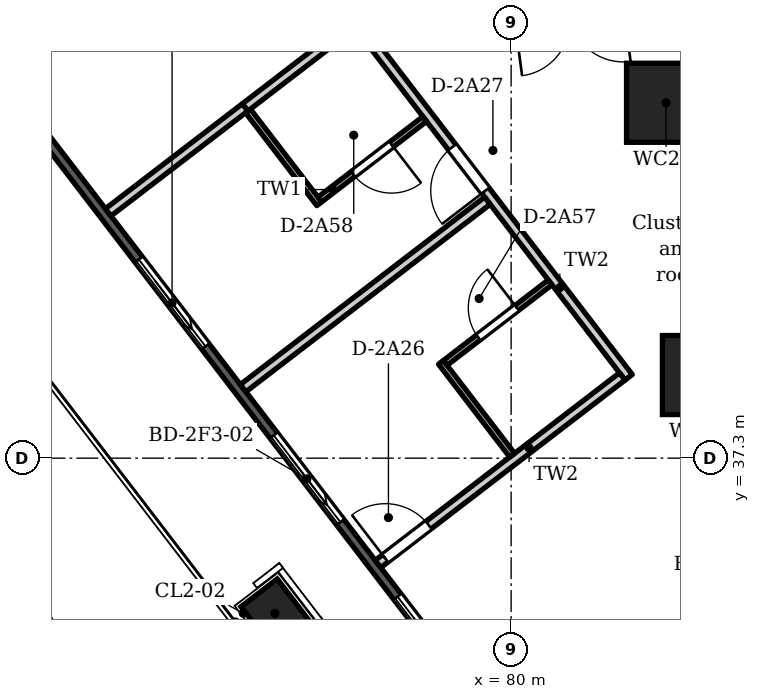
"""IFC4 building model, lengths in metres.
Left out: names, types, materials, properties, quantities, classifications, styles, units other than length and angle.
Written with IfcOpenShell. Run it as: python <this file> out.ifc"""

import sys

from ifc_helpers import new_model, si_unit, direction, frame, frame_2d, origin, origin_2d, place, context, subcontext, project, spatial, polyline, rectangle, circle, outline, extrude, element, fill, save


model = new_model("IFC4")
c1 = context("Model", 3, precision=1e-05, world=origin(), true_north=direction((0.0, 1.0)))
c2 = subcontext(c1, "Body", "Model", "MODEL_VIEW")
j1 = project(units=[si_unit("LENGTHUNIT", "METRE"), si_unit("PLANEANGLEUNIT", "RADIAN")], contexts=[c1])
p1 = place(None, origin())
s1 = spatial("IfcSite", under=j1, at=p1, CompositionType="ELEMENT")
p2 = place(p1, origin())
s2 = spatial("IfcBuilding", under=s1, at=p2, CompositionType="ELEMENT")
p3 = place(p2, frame((0.0, 0.0, 50.4)))
s3 = spatial("IfcBuildingStorey", under=s2, at=p3, CompositionType="ELEMENT", Elevation=50.4)
p4 = place(p3, frame((76.114, 34.749, -0.35), z_axis=(0.0, 0.0, 1.0), x_axis=(-0.608761429009, 0.793353340291, 0.0)))
e1 = element("IfcColumn", 1, at=p4, inside=s3, PredefinedType="COLUMN", context=c2, shape_type="SweptSolid", body=[
    extrude(rectangle(XDim=0.85, YDim=0.75, at=origin_2d()), origin(), (0.0, 0.0, 1.0), 3.95),
])
for number, where, z_axis, x_axis in (
    (2, (82.548, 43.145, -0.35), (0.0, 0.0, 1.0), (1.0, 0.0, 0.0)),
    (3, (83.138, 38.667, -0.35), (0.0, 0.0, 1.0), (1.0, 0.0, 0.0)),
):
    element("IfcColumn", number, at=place(p3, frame(where, z_axis=z_axis, x_axis=x_axis)), inside=s3, PredefinedType="COLUMN", context=c2, shape_type="SweptSolid", body=[
        extrude(circle(Radius=0.65, at=origin_2d()), origin(), (0.0, 0.0, 1.0), 3.95),
    ])
p5 = place(p3, frame((84.684, 34.584, 0.0), z_axis=(0.0, 0.0, 1.0), x_axis=(-0.991449308994, -0.130492404742, 0.0)))
e4 = element("IfcWall", 4, at=p5, inside=s3, PredefinedType="SOLIDWALL", context=c2, shape_type="SweptSolid", body=[
    extrude(outline(polyline([(0.0, -0.075), (2.0, -0.075), (2.0, 0.075), (0.0, 0.075), (0.0, -0.075)])), origin(), (0.0, 0.0, 1.0), 3.3),
])
p6 = place(p3, frame((79.969, 32.624, 0.0), z_axis=(0.0, 0.0, 1.0), x_axis=(-0.608761526367, 0.793353265585, 0.0)))
e5 = element("IfcWall", 5, at=p6, inside=s3, PredefinedType="SOLIDWALL", context=c2, shape_type="SweptSolid", body=[
    extrude(outline(polyline([(0.149, 0.075), (0.149, -0.075), (47.217, -0.075), (47.217, 0.075), (0.149, 0.075)])), origin(), (0.0, 0.0, 1.0), 3.3),
])
p7 = place(p6, frame((1.222, 0.0, 0.0)))
e6 = element("IfcOpeningElement", 6, at=p7, cuts=e5, PredefinedType="OPENING", context=c2, shape_type="SweptSolid", body=[
    extrude(rectangle(XDim=1.8, YDim=2.6, at=frame_2d((0.9, 1.3))), frame((0.0, 0.085, 0.0), z_axis=(0.0, -1.0, 0.0), x_axis=(1.0, 0.0, 0.0)), (0.0, 0.0, 1.0), 0.17),
])
p8 = place(p6, frame((4.565, 0.0, 0.0)))
e7 = element("IfcOpeningElement", 7, at=p8, cuts=e5, PredefinedType="OPENING", context=c2, shape_type="SweptSolid", body=[
    extrude(rectangle(XDim=1.8, YDim=2.6, at=frame_2d((0.9, 1.3))), frame((0.0, 0.085, 0.0), z_axis=(0.0, -1.0, 0.0), x_axis=(1.0, 0.0, 0.0)), (0.0, 0.0, 1.0), 0.17),
])
p9 = place(p6, frame((8.209, 0.0, 0.0)))
e8 = element("IfcOpeningElement", 8, at=p9, cuts=e5, PredefinedType="OPENING", context=c2, shape_type="SweptSolid", body=[
    extrude(rectangle(XDim=1.8, YDim=2.6, at=frame_2d((0.9, 1.3))), frame((0.0, 0.085, 0.0), z_axis=(0.0, -1.0, 0.0), x_axis=(1.0, 0.0, 0.0)), (0.0, 0.0, 1.0), 0.17),
])
p10 = place(p6, frame((12.453, 0.0, 0.0)))
e9 = element("IfcOpeningElement", 9, at=p10, cuts=e5, PredefinedType="OPENING", context=c2, shape_type="SweptSolid", body=[
    extrude(rectangle(XDim=1.8, YDim=2.6, at=frame_2d((0.9, 1.3))), frame((0.0, 0.085, 0.0), z_axis=(0.0, -1.0, 0.0), x_axis=(1.0, 0.0, 0.0)), (0.0, 0.0, 1.0), 0.17),
])
p11 = place(p6, frame((15.496, 0.0, 0.0)))
e10 = element("IfcOpeningElement", 10, at=p11, cuts=e5, PredefinedType="OPENING", context=c2, shape_type="SweptSolid", body=[
    extrude(rectangle(XDim=1.8, YDim=2.6, at=frame_2d((0.9, 1.3))), frame((0.0, 0.085, 0.0), z_axis=(0.0, -1.0, 0.0), x_axis=(1.0, 0.0, 0.0)), (0.0, 0.0, 1.0), 0.17),
])
p12 = place(p6, frame((18.84, 0.0, 0.15)))
e11 = element("IfcOpeningElement", 11, at=p12, cuts=e5, PredefinedType="OPENING", context=c2, shape_type="SweptSolid", body=[
    extrude(rectangle(XDim=2.4, YDim=2.45, at=frame_2d((1.2, 1.225))), frame((0.0, 0.085, 0.0), z_axis=(0.0, -1.0, 0.0), x_axis=(1.0, 0.0, 0.0)), (0.0, 0.0, 1.0), 0.17),
])
p13 = place(p6, frame((22.783, 0.0, 0.0)))
e12 = element("IfcOpeningElement", 12, at=p13, cuts=e5, PredefinedType="OPENING", context=c2, shape_type="SweptSolid", body=[
    extrude(rectangle(XDim=1.8, YDim=2.6, at=frame_2d((0.9, 1.3))), frame((0.0, 0.085, 0.0), z_axis=(0.0, -1.0, 0.0), x_axis=(1.0, 0.0, 0.0)), (0.0, 0.0, 1.0), 0.17),
])
p14 = place(p6, frame((26.127, 0.0, 0.15)))
e13 = element("IfcOpeningElement", 13, at=p14, cuts=e5, PredefinedType="OPENING", context=c2, shape_type="SweptSolid", body=[
    extrude(rectangle(XDim=2.4, YDim=2.45, at=frame_2d((1.2, 1.225))), frame((0.0, 0.085, 0.0), z_axis=(0.0, -1.0, 0.0), x_axis=(1.0, 0.0, 0.0)), (0.0, 0.0, 1.0), 0.17),
])
p15 = place(p6, frame((30.071, 0.0, 0.0)))
e14 = element("IfcOpeningElement", 14, at=p15, cuts=e5, PredefinedType="OPENING", context=c2, shape_type="SweptSolid", body=[
    extrude(rectangle(XDim=1.8, YDim=2.6, at=frame_2d((0.9, 1.3))), frame((0.0, 0.085, 0.0), z_axis=(0.0, -1.0, 0.0), x_axis=(1.0, 0.0, 0.0)), (0.0, 0.0, 1.0), 0.17),
])
p16 = place(p6, frame((33.114, 0.0, 0.0)))
e15 = element("IfcOpeningElement", 15, at=p16, cuts=e5, PredefinedType="OPENING", context=c2, shape_type="SweptSolid", body=[
    extrude(rectangle(XDim=1.8, YDim=2.6, at=frame_2d((0.9, 1.3))), frame((0.0, 0.085, 0.0), z_axis=(0.0, -1.0, 0.0), x_axis=(1.0, 0.0, 0.0)), (0.0, 0.0, 1.0), 0.17),
])
p17 = place(p6, frame((37.358, 0.0, 0.0)))
e16 = element("IfcOpeningElement", 16, at=p17, cuts=e5, PredefinedType="OPENING", context=c2, shape_type="SweptSolid", body=[
    extrude(rectangle(XDim=1.8, YDim=2.6, at=frame_2d((0.9, 1.3))), frame((0.0, 0.085, 0.0), z_axis=(0.0, -1.0, 0.0), x_axis=(1.0, 0.0, 0.0)), (0.0, 0.0, 1.0), 0.17),
])
p18 = place(p6, frame((41.001, 0.0, 0.0)))
e17 = element("IfcOpeningElement", 17, at=p18, cuts=e5, PredefinedType="OPENING", context=c2, shape_type="SweptSolid", body=[
    extrude(rectangle(XDim=1.8, YDim=2.6, at=frame_2d((0.9, 1.3))), frame((0.0, 0.085, 0.0), z_axis=(0.0, -1.0, 0.0), x_axis=(1.0, 0.0, 0.0)), (0.0, 0.0, 1.0), 0.17),
])
p19 = place(p6, frame((44.345, 0.0, 0.0)))
e18 = element("IfcOpeningElement", 18, at=p19, cuts=e5, PredefinedType="OPENING", context=c2, shape_type="SweptSolid", body=[
    extrude(rectangle(XDim=1.8, YDim=2.6, at=frame_2d((0.9, 1.3))), frame((0.0, 0.085, 0.0), z_axis=(0.0, -1.0, 0.0), x_axis=(1.0, 0.0, 0.0)), (0.0, 0.0, 1.0), 0.17),
])
p20 = place(p3, origin())
e19 = element("IfcWall", 19, at=p20, inside=s3, PredefinedType="PARAPET", context=c2, shape_type="SweptSolid", body=[
    extrude(outline(polyline([(61.885, 52.307), (76.536, 26.931), (76.709, 27.231), (63.284, 50.483), (61.885, 52.307)])), origin(), (0.0, 0.0, 1.0), 1.1),
])
p21 = place(p3, frame((71.088, 52.766, 0.0), z_axis=(0.0, 0.0, 1.0), x_axis=(0.608663951432, -0.793428127953, 0.0)))
e20 = element("IfcWall", 20, at=p21, inside=s3, PredefinedType="PARTITIONING", context=c2, shape_type="SweptSolid", body=[
    extrude(rectangle(XDim=17.817, YDim=0.15, at=frame_2d((8.909, 0.0))), origin(), (0.0, 0.0, 1.0), 3.3),
])
p22 = place(p21, frame((13.048, 0.0, 0.0)))
e21 = element("IfcOpeningElement", 21, at=p22, cuts=e20, PredefinedType="OPENING", context=c2, shape_type="SweptSolid", body=[
    extrude(rectangle(XDim=0.9, YDim=2.1, at=frame_2d((0.45, 1.05))), frame((0.0, 0.085, 0.0), z_axis=(0.0, -1.0, 0.0), x_axis=(1.0, 0.0, 0.0)), (0.0, 0.0, 1.0), 0.17),
])
p23 = place(p21, frame((8.133, 0.0, 0.0)))
e22 = element("IfcOpeningElement", 22, at=p23, cuts=e20, PredefinedType="OPENING", context=c2, shape_type="SweptSolid", body=[
    extrude(rectangle(XDim=1.0, YDim=2.1, at=frame_2d((0.5, 1.05))), frame((0.0, 0.085, 0.0), z_axis=(0.0, -1.0, 0.0), x_axis=(1.0, 0.0, 0.0)), (0.0, 0.0, 1.0), 0.17),
])
p24 = place(p21, frame((3.318, 0.0, 0.0)))
e23 = element("IfcOpeningElement", 23, at=p24, cuts=e20, PredefinedType="OPENING", context=c2, shape_type="SweptSolid", body=[
    extrude(rectangle(XDim=0.9, YDim=2.1, at=frame_2d((0.45, 1.05))), frame((0.0, 0.085, 0.0), z_axis=(0.0, -1.0, 0.0), x_axis=(1.0, 0.0, 0.0)), (0.0, 0.0, 1.0), 0.17),
])
p25 = place(p21, frame((2.118, 0.0, 0.0)))
e24 = element("IfcOpeningElement", 24, at=p25, cuts=e20, PredefinedType="OPENING", context=c2, shape_type="SweptSolid", body=[
    extrude(rectangle(XDim=0.9, YDim=2.1, at=frame_2d((0.45, 1.05))), frame((0.0, 0.085, 0.0), z_axis=(0.0, -1.0, 0.0), x_axis=(1.0, 0.0, 0.0)), (0.0, 0.0, 1.0), 0.17),
])
p26 = place(p3, frame((73.374, 41.342, 0.0), z_axis=(0.0, 0.0, 1.0), x_axis=(0.793546848587, 0.608509161063, 0.0)))
e25 = element("IfcWall", 25, at=p26, inside=s3, PredefinedType="PARTITIONING", context=c2, shape_type="SweptSolid", body=[
    extrude(rectangle(XDim=2.839, YDim=0.15, at=frame_2d((1.42, 0.0))), origin(), (0.0, 0.0, 1.0), 3.3),
])
p27 = place(p3, frame((75.593, 38.451, 0.0), z_axis=(0.0, 0.0, 1.0), x_axis=(0.793302827183, 0.608827253318, 0.0)))
e26 = element("IfcWall", 26, at=p27, inside=s3, PredefinedType="PARTITIONING", context=c2, shape_type="SweptSolid", body=[
    extrude(rectangle(XDim=5.063, YDim=0.15, at=frame_2d((2.532, 0.0))), origin(), (0.0, 0.0, 1.0), 3.3),
])
p28 = place(p3, frame((75.673, 43.01, 0.0), z_axis=(0.0, 0.0, 1.0), x_axis=(0.608790940556, -0.793330694412, 0.0)))
e27 = element("IfcWall", 27, at=p28, inside=s3, PredefinedType="PARTITIONING", context=c2, shape_type="SweptSolid", body=[
    extrude(rectangle(XDim=1.925, YDim=0.1, at=frame_2d((0.962, 0.0))), origin(), (0.0, 0.0, 1.0), 3.3),
])
p29 = place(p3, frame((75.627, 43.07, 0.0), z_axis=(0.0, 0.0, 1.0), x_axis=(0.793313024441, 0.608813966045, 0.0)))
e28 = element("IfcWall", 28, at=p29, inside=s3, PredefinedType="PARTITIONING", context=c2, shape_type="SweptSolid", body=[
    extrude(rectangle(XDim=2.224, YDim=0.15, at=frame_2d((1.112, 0.0))), origin(), (0.0, 0.0, 1.0), 3.3),
])
p30 = place(p3, frame((76.854, 41.553, 0.0), z_axis=(0.0, 0.0, 1.0), x_axis=(0.793308064866, 0.608820428549, 0.0)))
e29 = element("IfcWall", 29, at=p30, inside=s3, PredefinedType="PARTITIONING", context=c2, shape_type="SweptSolid", body=[
    extrude(rectangle(XDim=2.174, YDim=0.1, at=frame_2d((1.087, 0.0))), origin(), (0.0, 0.0, 1.0), 3.3),
])
p31 = place(p30, frame((0.687, 0.0, 0.0)))
e30 = element("IfcOpeningElement", 30, at=p31, cuts=e29, PredefinedType="OPENING", context=c2, shape_type="SweptSolid", body=[
    extrude(rectangle(XDim=0.8, YDim=2.1, at=frame_2d((0.4, 1.05))), frame((0.0, 0.06, 0.0), z_axis=(0.0, -1.0, 0.0), x_axis=(1.0, 0.0, 0.0)), (0.0, 0.0, 1.0), 0.12),
])
p32 = place(p3, frame((77.811, 35.56, 0.0), z_axis=(0.0, 0.0, 1.0), x_axis=(0.793261664916, 0.60888088406, 0.0)))
e31 = element("IfcWall", 31, at=p32, inside=s3, PredefinedType="PARTITIONING", context=c2, shape_type="SweptSolid", body=[
    extrude(rectangle(XDim=5.063, YDim=0.15, at=frame_2d((2.532, 0.0))), origin(), (0.0, 0.0, 1.0), 3.3),
])
p33 = place(p32, frame((0.15, 0.0, 0.0)))
e32 = element("IfcOpeningElement", 32, at=p33, cuts=e31, PredefinedType="OPENING", context=c2, shape_type="SweptSolid", body=[
    extrude(rectangle(XDim=0.9, YDim=2.1, at=frame_2d((0.45, 1.05))), frame((0.0, 0.085, 0.0), z_axis=(0.0, -1.0, 0.0), x_axis=(1.0, 0.0, 0.0)), (0.0, 0.0, 1.0), 0.17),
])
p34 = place(p3, frame((78.846, 38.876, 0.0), z_axis=(0.0, 0.0, 1.0), x_axis=(0.608649853766, -0.793438942522, 0.0)))
e33 = element("IfcWall", 33, at=p34, inside=s3, PredefinedType="PARTITIONING", context=c2, shape_type="SweptSolid", body=[
    extrude(rectangle(XDim=1.925, YDim=0.1, at=frame_2d((0.962, 0.0))), origin(), (0.0, 0.0, 1.0), 3.3),
])
p35 = place(p3, frame((78.916, 38.866, 0.0), z_axis=(0.0, 0.0, 1.0), x_axis=(0.793266438723, 0.608874664603, 0.0)))
e34 = element("IfcWall", 34, at=p35, inside=s3, PredefinedType="PARTITIONING", context=c2, shape_type="SweptSolid", body=[
    extrude(rectangle(XDim=2.174, YDim=0.1, at=frame_2d((1.087, 0.0))), origin(), (0.0, 0.0, 1.0), 3.3),
])
p36 = place(p35, frame((0.687, 0.0, 0.0)))
e35 = element("IfcOpeningElement", 35, at=p36, cuts=e34, PredefinedType="OPENING", context=c2, shape_type="SweptSolid", body=[
    extrude(rectangle(XDim=0.8, YDim=2.1, at=frame_2d((0.4, 1.05))), frame((0.0, 0.06, 0.0), z_axis=(0.0, -1.0, 0.0), x_axis=(1.0, 0.0, 0.0)), (0.0, 0.0, 1.0), 0.12),
])
p37 = place(p7, origin())
e36 = element("IfcDoor", 36, at=p37, inside=s3, OperationType="SLIDING_TO_LEFT", PredefinedType="DOOR", context=c2, shape_type="SweptSolid", body=[
    extrude(rectangle(XDim=1.8, YDim=2.6, at=frame_2d((0.9, 1.3))), frame((0.0, 0.025, 0.0), z_axis=(0.0, -1.0, 0.0), x_axis=(1.0, 0.0, 0.0)), (0.0, 0.0, 1.0), 0.05),
])
fill(e6, e36)
p38 = place(p8, origin())
e37 = element("IfcDoor", 37, at=p38, inside=s3, OperationType="SLIDING_TO_LEFT", PredefinedType="DOOR", context=c2, shape_type="SweptSolid", body=[
    extrude(rectangle(XDim=1.8, YDim=2.6, at=frame_2d((0.9, 1.3))), frame((0.0, 0.025, 0.0), z_axis=(0.0, -1.0, 0.0), x_axis=(1.0, 0.0, 0.0)), (0.0, 0.0, 1.0), 0.05),
])
fill(e7, e37)
p39 = place(p9, origin())
e38 = element("IfcDoor", 38, at=p39, inside=s3, OperationType="SLIDING_TO_LEFT", PredefinedType="DOOR", context=c2, shape_type="SweptSolid", body=[
    extrude(rectangle(XDim=1.8, YDim=2.6, at=frame_2d((0.9, 1.3))), frame((0.0, 0.025, 0.0), z_axis=(0.0, -1.0, 0.0), x_axis=(1.0, 0.0, 0.0)), (0.0, 0.0, 1.0), 0.05),
])
fill(e8, e38)
p40 = place(p33, origin())
e39 = element("IfcDoor", 39, at=p40, inside=s3, OperationType="SINGLE_SWING_LEFT", PredefinedType="DOOR", context=c2, shape_type="SweptSolid", body=[
    extrude(rectangle(XDim=0.9, YDim=2.1, at=frame_2d((0.45, 1.05))), frame((0.0, 0.025, 0.0), z_axis=(0.0, -1.0, 0.0), x_axis=(1.0, 0.0, 0.0)), (0.0, 0.0, 1.0), 0.05),
])
fill(e32, e39)
p41 = place(p22, frame((0.9, 0.0, 0.0), z_axis=(0.0, 0.0, 1.0), x_axis=(-1.0, 0.0, 0.0)))
e40 = element("IfcDoor", 40, at=p41, inside=s3, OperationType="SINGLE_SWING_LEFT", PredefinedType="DOOR", context=c2, shape_type="SweptSolid", body=[
    extrude(rectangle(XDim=0.9, YDim=2.1, at=frame_2d((0.45, 1.05))), frame((0.0, 0.025, 0.0), z_axis=(0.0, -1.0, 0.0), x_axis=(1.0, 0.0, 0.0)), (0.0, 0.0, 1.0), 0.05),
])
fill(e21, e40)
p42 = place(p36, origin())
e41 = element("IfcDoor", 41, at=p42, inside=s3, OperationType="SINGLE_SWING_RIGHT", PredefinedType="DOOR", context=c2, shape_type="SweptSolid", body=[
    extrude(rectangle(XDim=0.8, YDim=2.1, at=frame_2d((0.4, 1.05))), frame((0.0, 0.025, 0.0), z_axis=(0.0, -1.0, 0.0), x_axis=(1.0, 0.0, 0.0)), (0.0, 0.0, 1.0), 0.05),
])
fill(e35, e41)
p43 = place(p31, frame((0.8, 0.0, 0.0), z_axis=(0.0, 0.0, 1.0), x_axis=(-1.0, 0.0, 0.0)))
e42 = element("IfcDoor", 42, at=p43, inside=s3, OperationType="SINGLE_SWING_LEFT", PredefinedType="DOOR", context=c2, shape_type="SweptSolid", body=[
    extrude(rectangle(XDim=0.8, YDim=2.1, at=frame_2d((0.4, 1.05))), frame((0.0, 0.025, 0.0), z_axis=(0.0, -1.0, 0.0), x_axis=(1.0, 0.0, 0.0)), (0.0, 0.0, 1.0), 0.05),
])
fill(e30, e42)
save(model, sys.argv[1])
